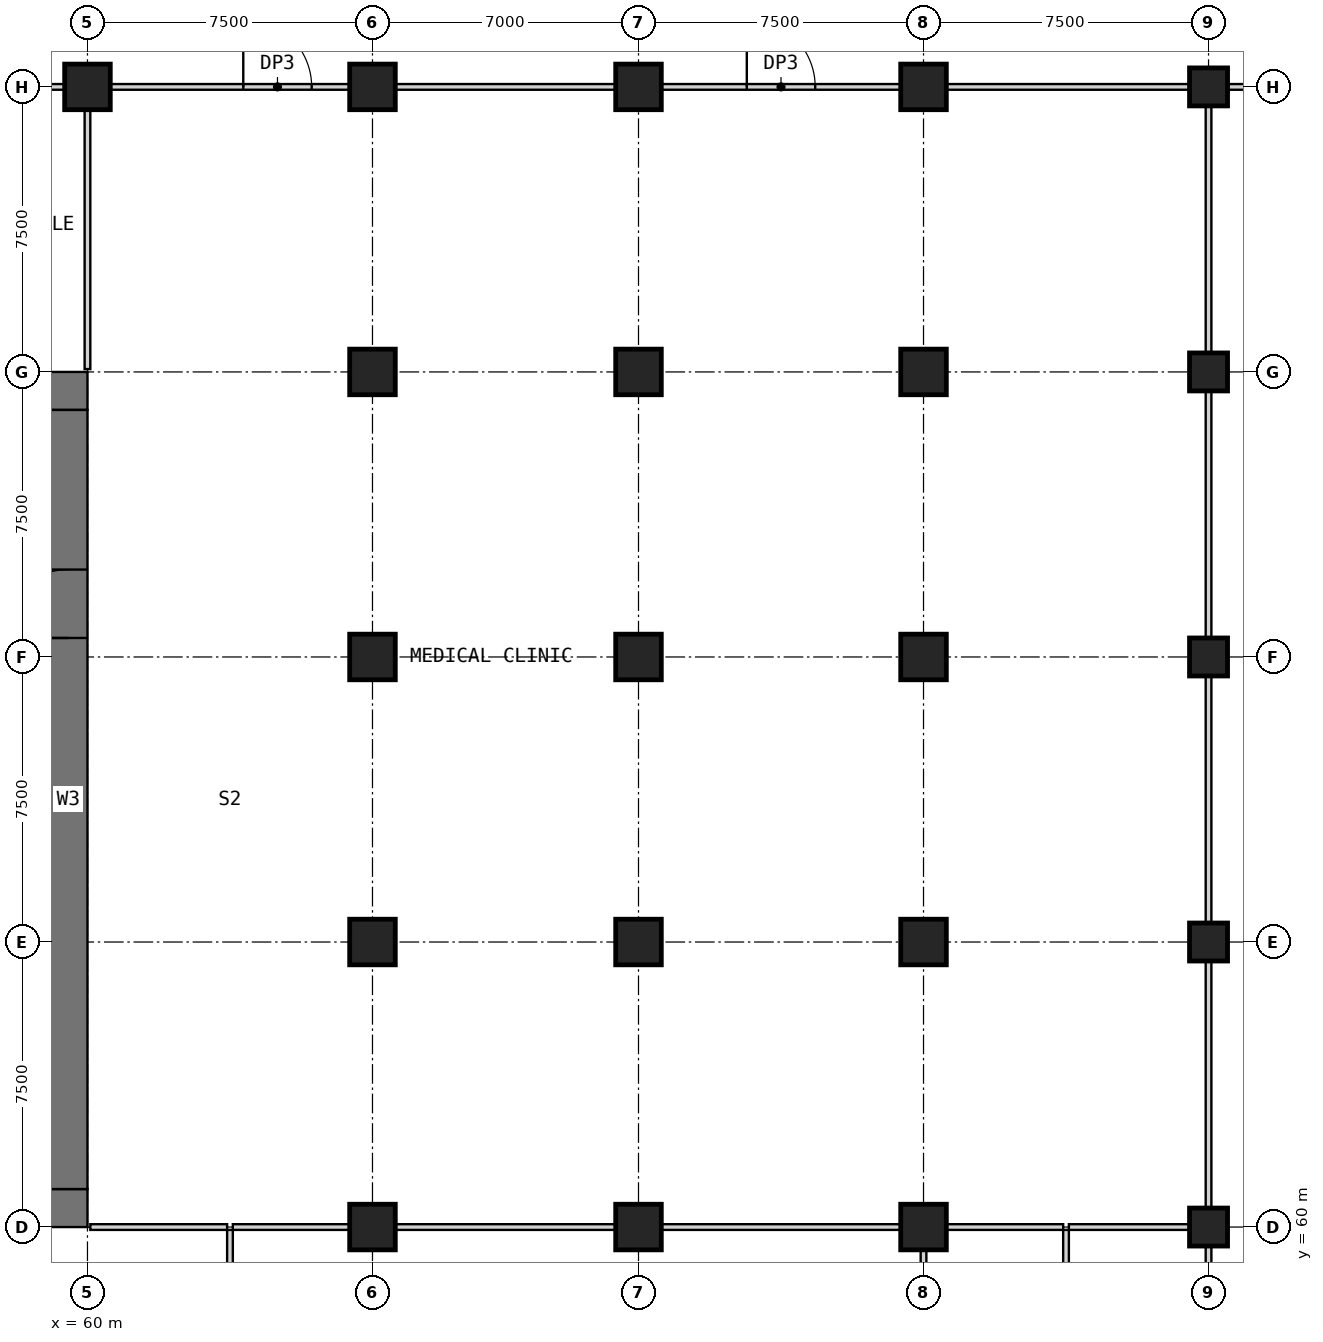
"""IFC4 building model, lengths in metres.
Left out: names, types, materials, properties, quantities, classifications, styles, units other than length and angle.
Written with IfcOpenShell. Run it as: python <this file> out.ifc"""

import sys

from ifc_helpers import new_model, si_unit, direction, frame, frame_2d, origin, origin_2d, place, context, subcontext, project, spatial, rectangle, extrude, element, fill, save


model = new_model("IFC4")
c1 = context("Model", 3, precision=1e-05, world=origin(), true_north=direction((0.0, 1.0)))
c2 = subcontext(c1, "Body", "Model", "MODEL_VIEW")
j1 = project(units=[si_unit("LENGTHUNIT", "METRE"), si_unit("PLANEANGLEUNIT", "RADIAN")], contexts=[c1])
p1 = place(None, origin())
s1 = spatial("IfcSite", under=j1, at=p1, CompositionType="ELEMENT")
p2 = place(p1, origin())
s2 = spatial("IfcBuilding", under=s1, at=p2, CompositionType="ELEMENT")
p3 = place(p2, frame((0.0, 0.0, 8.0)))
s3 = spatial("IfcBuildingStorey", under=s2, at=p3, CompositionType="ELEMENT", Elevation=8.0)
for number, where, z_axis, x_axis in (
    (1, (60.0, 90.0, 0.0), (0.0, 0.0, 1.0), (1.0, 0.0, 0.0)),
    (2, (67.5, 60.0, 0.0), (0.0, 0.0, 1.0), (1.0, 0.0, 0.0)),
    (3, (67.5, 67.5, 0.0), (0.0, 0.0, 1.0), (1.0, 0.0, 0.0)),
    (4, (67.5, 75.0, 0.0), (0.0, 0.0, 1.0), (1.0, 0.0, 0.0)),
    (5, (67.5, 82.5, 0.0), (0.0, 0.0, 1.0), (1.0, 0.0, 0.0)),
    (6, (67.5, 90.0, 0.0), (0.0, 0.0, 1.0), (1.0, 0.0, 0.0)),
    (7, (74.5, 60.0, 0.0), (0.0, 0.0, 1.0), (1.0, 0.0, 0.0)),
    (8, (74.5, 67.5, 0.0), (0.0, 0.0, 1.0), (1.0, 0.0, 0.0)),
    (9, (74.5, 75.0, 0.0), (0.0, 0.0, 1.0), (1.0, 0.0, 0.0)),
    (10, (74.5, 82.5, 0.0), (0.0, 0.0, 1.0), (1.0, 0.0, 0.0)),
    (11, (74.5, 90.0, 0.0), (0.0, 0.0, 1.0), (1.0, 0.0, 0.0)),
    (12, (82.0, 60.0, 0.0), (0.0, 0.0, 1.0), (1.0, 0.0, 0.0)),
    (13, (82.0, 67.5, 0.0), (0.0, 0.0, 1.0), (1.0, 0.0, 0.0)),
    (14, (82.0, 75.0, 0.0), (0.0, 0.0, 1.0), (1.0, 0.0, 0.0)),
    (15, (82.0, 82.5, 0.0), (0.0, 0.0, 1.0), (1.0, 0.0, 0.0)),
    (16, (82.0, 90.0, 0.0), (0.0, 0.0, 1.0), (1.0, 0.0, 0.0)),
):
    element("IfcColumn", number, at=place(p3, frame(where, z_axis=z_axis, x_axis=x_axis)), inside=s3, PredefinedType="COLUMN", context=c2, shape_type="SweptSolid", body=[
        extrude(rectangle(XDim=1.2, YDim=1.2, at=origin_2d()), origin(), (0.0, 0.0, 1.0), 5.5),
    ])
for number, where, z_axis, x_axis in (
    (17, (89.5, 60.0, 0.0), (0.0, 0.0, 1.0), (1.0, 0.0, 0.0)),
    (18, (89.5, 67.5, 0.0), (0.0, 0.0, 1.0), (1.0, 0.0, 0.0)),
    (19, (89.5, 75.0, 0.0), (0.0, 0.0, 1.0), (1.0, 0.0, 0.0)),
    (20, (89.5, 82.5, 0.0), (0.0, 0.0, 1.0), (1.0, 0.0, 0.0)),
    (21, (89.5, 90.0, 0.0), (0.0, 0.0, 1.0), (1.0, 0.0, 0.0)),
):
    element("IfcColumn", number, at=place(p3, frame(where, z_axis=z_axis, x_axis=x_axis)), inside=s3, PredefinedType="COLUMN", context=c2, shape_type="SweptSolid", body=[
        extrude(rectangle(XDim=1.0, YDim=1.0, at=origin_2d()), origin(), (0.0, 0.0, 1.0), 5.5),
    ])
p4 = place(p3, frame((30.0, 60.5, 0.0), z_axis=(0.0, 0.0, 1.0), x_axis=(1.0, 0.0, 0.0)))
e22 = element("IfcWall", 22, at=p4, inside=s3, PredefinedType="SHEAR", context=c2, shape_type="SweptSolid", body=[
    extrude(rectangle(XDim=30.0, YDim=1.0, at=frame_2d((15.0, 0.0))), origin(), (0.0, 0.0, 1.0), 5.5),
])
p5 = place(p4, frame((21.9, 0.0, 0.0)))
e23 = element("IfcOpeningElement", 23, at=p5, cuts=e22, PredefinedType="OPENING", context=c2, shape_type="SweptSolid", body=[
    extrude(rectangle(XDim=1.8, YDim=2.1, at=frame_2d((0.9, 1.05))), frame((0.0, 0.51, 0.0), z_axis=(0.0, -1.0, 0.0), x_axis=(1.0, 0.0, 0.0)), (0.0, 0.0, 1.0), 1.02),
])
p6 = place(p4, frame((26.5, 0.0, 0.0)))
e24 = element("IfcOpeningElement", 24, at=p6, cuts=e22, PredefinedType="OPENING", context=c2, shape_type="SweptSolid", body=[
    extrude(rectangle(XDim=1.2, YDim=2.1, at=frame_2d((0.6, 1.05))), frame((0.0, 0.51, 0.0), z_axis=(0.0, -1.0, 0.0), x_axis=(1.0, 0.0, 0.0)), (0.0, 0.0, 1.0), 1.02),
])
p7 = place(p3, frame((30.0, 82.0, 0.0), z_axis=(0.0, 0.0, 1.0), x_axis=(1.0, 0.0, 0.0)))
e25 = element("IfcWall", 25, at=p7, inside=s3, PredefinedType="SHEAR", context=c2, shape_type="SweptSolid", body=[
    extrude(rectangle(XDim=30.0, YDim=1.0, at=frame_2d((15.0, 0.0))), origin(), (0.0, 0.0, 1.0), 5.5),
])
p8 = place(p3, frame((59.5, 61.0, 0.0), z_axis=(0.0, 0.0, 1.0), x_axis=(0.0, 1.0, 0.0)))
e26 = element("IfcWall", 26, at=p8, inside=s3, PredefinedType="SHEAR", context=c2, shape_type="SweptSolid", body=[
    extrude(rectangle(XDim=20.5, YDim=1.0, at=frame_2d((10.25, 0.0))), origin(), (0.0, 0.0, 1.0), 5.5),
])
p9 = place(p8, frame((14.5, 0.0, 0.0)))
e27 = element("IfcOpeningElement", 27, at=p9, cuts=e26, PredefinedType="OPENING", context=c2, shape_type="SweptSolid", body=[
    extrude(rectangle(XDim=1.8, YDim=2.1, at=frame_2d((0.9, 1.05))), frame((0.0, 0.51, 0.0), z_axis=(0.0, -1.0, 0.0), x_axis=(1.0, 0.0, 0.0)), (0.0, 0.0, 1.0), 1.02),
])
p10 = place(p3, frame((60.075, 60.0, 0.0), z_axis=(0.0, 0.0, 1.0), x_axis=(1.0, 0.0, 0.0)))
e28 = element("IfcWall", 28, at=p10, inside=s3, PredefinedType="PARTITIONING", context=c2, shape_type="SweptSolid", body=[
    extrude(rectangle(XDim=3.6, YDim=0.15, at=frame_2d((1.8, 0.0))), origin(), (0.0, 0.0, 1.0), 5.2),
])
p11 = place(p3, frame((63.825, 60.0, 0.0), z_axis=(0.0, 0.0, 1.0), x_axis=(1.0, 0.0, 0.0)))
e29 = element("IfcWall", 29, at=p11, inside=s3, PredefinedType="PARTITIONING", context=c2, shape_type="SweptSolid", body=[
    extrude(rectangle(XDim=3.075, YDim=0.15, at=frame_2d((1.538, 0.0))), origin(), (0.0, 0.0, 1.0), 5.2),
])
p12 = place(p3, frame((68.1, 60.0, 0.0), z_axis=(0.0, 0.0, 1.0), x_axis=(1.0, 0.0, 0.0)))
e30 = element("IfcWall", 30, at=p12, inside=s3, PredefinedType="PARTITIONING", context=c2, shape_type="SweptSolid", body=[
    extrude(rectangle(XDim=5.8, YDim=0.15, at=frame_2d((2.9, 0.0))), origin(), (0.0, 0.0, 1.0), 5.2),
])
p13 = place(p3, frame((75.1, 60.0, 0.0), z_axis=(0.0, 0.0, 1.0), x_axis=(1.0, 0.0, 0.0)))
e31 = element("IfcWall", 31, at=p13, inside=s3, PredefinedType="PARTITIONING", context=c2, shape_type="SweptSolid", body=[
    extrude(rectangle(XDim=6.3, YDim=0.15, at=frame_2d((3.15, 0.0))), origin(), (0.0, 0.0, 1.0), 5.2),
])
p14 = place(p3, frame((82.6, 60.0, 0.0), z_axis=(0.0, 0.0, 1.0), x_axis=(1.0, 0.0, 0.0)))
e32 = element("IfcWall", 32, at=p14, inside=s3, PredefinedType="PARTITIONING", context=c2, shape_type="SweptSolid", body=[
    extrude(rectangle(XDim=3.075, YDim=0.15, at=frame_2d((1.538, 0.0))), origin(), (0.0, 0.0, 1.0), 5.2),
])
p15 = place(p3, frame((85.825, 60.0, 0.0), z_axis=(0.0, 0.0, 1.0), x_axis=(1.0, 0.0, 0.0)))
e33 = element("IfcWall", 33, at=p15, inside=s3, PredefinedType="PARTITIONING", context=c2, shape_type="SweptSolid", body=[
    extrude(rectangle(XDim=3.175, YDim=0.15, at=frame_2d((1.587, 0.0))), origin(), (0.0, 0.0, 1.0), 5.2),
])
p16 = place(p3, frame((56.325, 90.0, 0.0), z_axis=(0.0, 0.0, 1.0), x_axis=(1.0, 0.0, 0.0)))
e34 = element("IfcWall", 34, at=p16, inside=s3, PredefinedType="PARTITIONING", context=c2, shape_type="SweptSolid", body=[
    extrude(rectangle(XDim=3.075, YDim=0.15, at=frame_2d((1.538, 0.0))), origin(), (0.0, 0.0, 1.0), 5.2),
])
p17 = place(p16, frame((1.25, 0.0, 0.0)))
e35 = element("IfcOpeningElement", 35, at=p17, cuts=e34, PredefinedType="OPENING", context=c2, shape_type="SweptSolid", body=[
    extrude(rectangle(XDim=1.0, YDim=2.1, at=frame_2d((0.5, 1.05))), frame((0.0, 0.085, 0.0), z_axis=(0.0, -1.0, 0.0), x_axis=(1.0, 0.0, 0.0)), (0.0, 0.0, 1.0), 0.17),
])
p18 = place(p3, frame((60.6, 90.0, 0.0), z_axis=(0.0, 0.0, 1.0), x_axis=(1.0, 0.0, 0.0)))
e36 = element("IfcWall", 36, at=p18, inside=s3, PredefinedType="PARTITIONING", context=c2, shape_type="SweptSolid", body=[
    extrude(rectangle(XDim=6.3, YDim=0.15, at=frame_2d((3.15, 0.0))), origin(), (0.0, 0.0, 1.0), 5.2),
])
p19 = place(p18, frame((3.5, 0.0, 0.0)))
e37 = element("IfcOpeningElement", 37, at=p19, cuts=e36, PredefinedType="OPENING", context=c2, shape_type="SweptSolid", body=[
    extrude(rectangle(XDim=1.8, YDim=2.4, at=frame_2d((0.9, 1.2))), frame((0.0, 0.085, 0.0), z_axis=(0.0, -1.0, 0.0), x_axis=(1.0, 0.0, 0.0)), (0.0, 0.0, 1.0), 0.17),
])
p20 = place(p3, frame((68.1, 90.0, 0.0), z_axis=(0.0, 0.0, 1.0), x_axis=(1.0, 0.0, 0.0)))
e38 = element("IfcWall", 38, at=p20, inside=s3, PredefinedType="PARTITIONING", context=c2, shape_type="SweptSolid", body=[
    extrude(rectangle(XDim=5.8, YDim=0.15, at=frame_2d((2.9, 0.0))), origin(), (0.0, 0.0, 1.0), 5.2),
])
p21 = place(p3, frame((75.1, 90.0, 0.0), z_axis=(0.0, 0.0, 1.0), x_axis=(1.0, 0.0, 0.0)))
e39 = element("IfcWall", 39, at=p21, inside=s3, PredefinedType="PARTITIONING", context=c2, shape_type="SweptSolid", body=[
    extrude(rectangle(XDim=6.3, YDim=0.15, at=frame_2d((3.15, 0.0))), origin(), (0.0, 0.0, 1.0), 5.2),
])
p22 = place(p21, frame((2.25, 0.0, 0.0)))
e40 = element("IfcOpeningElement", 40, at=p22, cuts=e39, PredefinedType="OPENING", context=c2, shape_type="SweptSolid", body=[
    extrude(rectangle(XDim=1.8, YDim=2.4, at=frame_2d((0.9, 1.2))), frame((0.0, 0.085, 0.0), z_axis=(0.0, -1.0, 0.0), x_axis=(1.0, 0.0, 0.0)), (0.0, 0.0, 1.0), 0.17),
])
for number, where, z_axis, x_axis in (
    (41, (82.6, 90.0, 0.0), (0.0, 0.0, 1.0), (1.0, 0.0, 0.0)),
    (42, (90.0, 90.0, 0.0), (0.0, 0.0, 1.0), (1.0, 0.0, 0.0)),
):
    element("IfcWall", number, at=place(p3, frame(where, z_axis=z_axis, x_axis=x_axis)), inside=s3, PredefinedType="PARTITIONING", context=c2, shape_type="SweptSolid", body=[
        extrude(rectangle(XDim=6.4, YDim=0.15, at=frame_2d((3.2, 0.0))), origin(), (0.0, 0.0, 1.0), 5.2),
    ])
p23 = place(p3, frame((63.75, 52.575, 0.0), z_axis=(0.0, 0.0, 1.0), x_axis=(0.0, 1.0, 0.0)))
e43 = element("IfcWall", 43, at=p23, inside=s3, PredefinedType="PARTITIONING", context=c2, shape_type="SweptSolid", body=[
    extrude(rectangle(XDim=7.35, YDim=0.15, at=frame_2d((3.675, 0.0))), origin(), (0.0, 0.0, 1.0), 5.2),
])
for number, where, z_axis, x_axis in (
    (44, (89.5, 53.0, 0.0), (0.0, 0.0, 1.0), (0.0, 1.0, 0.0)),
    (45, (89.5, 60.5, 0.0), (0.0, 0.0, 1.0), (0.0, 1.0, 0.0)),
    (46, (89.5, 68.0, 0.0), (0.0, 0.0, 1.0), (0.0, 1.0, 0.0)),
    (47, (89.5, 75.5, 0.0), (0.0, 0.0, 1.0), (0.0, 1.0, 0.0)),
    (48, (89.5, 83.0, 0.0), (0.0, 0.0, 1.0), (0.0, 1.0, 0.0)),
):
    element("IfcWall", number, at=place(p3, frame(where, z_axis=z_axis, x_axis=x_axis)), inside=s3, PredefinedType="PARTITIONING", context=c2, shape_type="SweptSolid", body=[
        extrude(rectangle(XDim=6.5, YDim=0.15, at=frame_2d((3.25, 0.0))), origin(), (0.0, 0.0, 1.0), 5.2),
    ])
p24 = place(p3, frame((82.0, 53.1, 0.0), z_axis=(0.0, 0.0, 1.0), x_axis=(0.0, 1.0, 0.0)))
e49 = element("IfcWall", 49, at=p24, inside=s3, PredefinedType="PARTITIONING", context=c2, shape_type="SweptSolid", body=[
    extrude(rectangle(XDim=6.3, YDim=0.15, at=frame_2d((3.15, 0.0))), origin(), (0.0, 0.0, 1.0), 5.2),
])
p25 = place(p3, frame((85.75, 52.575, 0.0), z_axis=(0.0, 0.0, 1.0), x_axis=(0.0, 1.0, 0.0)))
e50 = element("IfcWall", 50, at=p25, inside=s3, PredefinedType="PARTITIONING", context=c2, shape_type="SweptSolid", body=[
    extrude(rectangle(XDim=7.35, YDim=0.15, at=frame_2d((3.675, 0.0))), origin(), (0.0, 0.0, 1.0), 5.2),
])
p26 = place(p3, frame((60.0, 82.575, 0.0), z_axis=(0.0, 0.0, 1.0), x_axis=(0.0, 1.0, 0.0)))
e51 = element("IfcWall", 51, at=p26, inside=s3, PredefinedType="PARTITIONING", context=c2, shape_type="SweptSolid", body=[
    extrude(rectangle(XDim=6.825, YDim=0.15, at=frame_2d((3.413, 0.0))), origin(), (0.0, 0.0, 1.0), 5.2),
])
p27 = place(p9, origin())
e52 = element("IfcDoor", 52, at=p27, inside=s3, OperationType="DOUBLE_DOOR_SINGLE_SWING", PredefinedType="DOOR", context=c2, shape_type="SweptSolid", body=[
    extrude(rectangle(XDim=1.8, YDim=2.1, at=frame_2d((0.9, 1.05))), frame((0.0, 0.025, 0.0), z_axis=(0.0, -1.0, 0.0), x_axis=(1.0, 0.0, 0.0)), (0.0, 0.0, 1.0), 0.05),
])
fill(e27, e52)
p28 = place(p19, origin())
e53 = element("IfcDoor", 53, at=p28, inside=s3, OperationType="SINGLE_SWING_LEFT", PredefinedType="DOOR", context=c2, shape_type="SweptSolid", body=[
    extrude(rectangle(XDim=1.8, YDim=2.4, at=frame_2d((0.9, 1.2))), frame((0.0, 0.025, 0.0), z_axis=(0.0, -1.0, 0.0), x_axis=(1.0, 0.0, 0.0)), (0.0, 0.0, 1.0), 0.05),
])
fill(e37, e53)
p29 = place(p22, origin())
e54 = element("IfcDoor", 54, at=p29, inside=s3, OperationType="SINGLE_SWING_LEFT", PredefinedType="DOOR", context=c2, shape_type="SweptSolid", body=[
    extrude(rectangle(XDim=1.8, YDim=2.4, at=frame_2d((0.9, 1.2))), frame((0.0, 0.025, 0.0), z_axis=(0.0, -1.0, 0.0), x_axis=(1.0, 0.0, 0.0)), (0.0, 0.0, 1.0), 0.05),
])
fill(e40, e54)
save(model, sys.argv[1])
